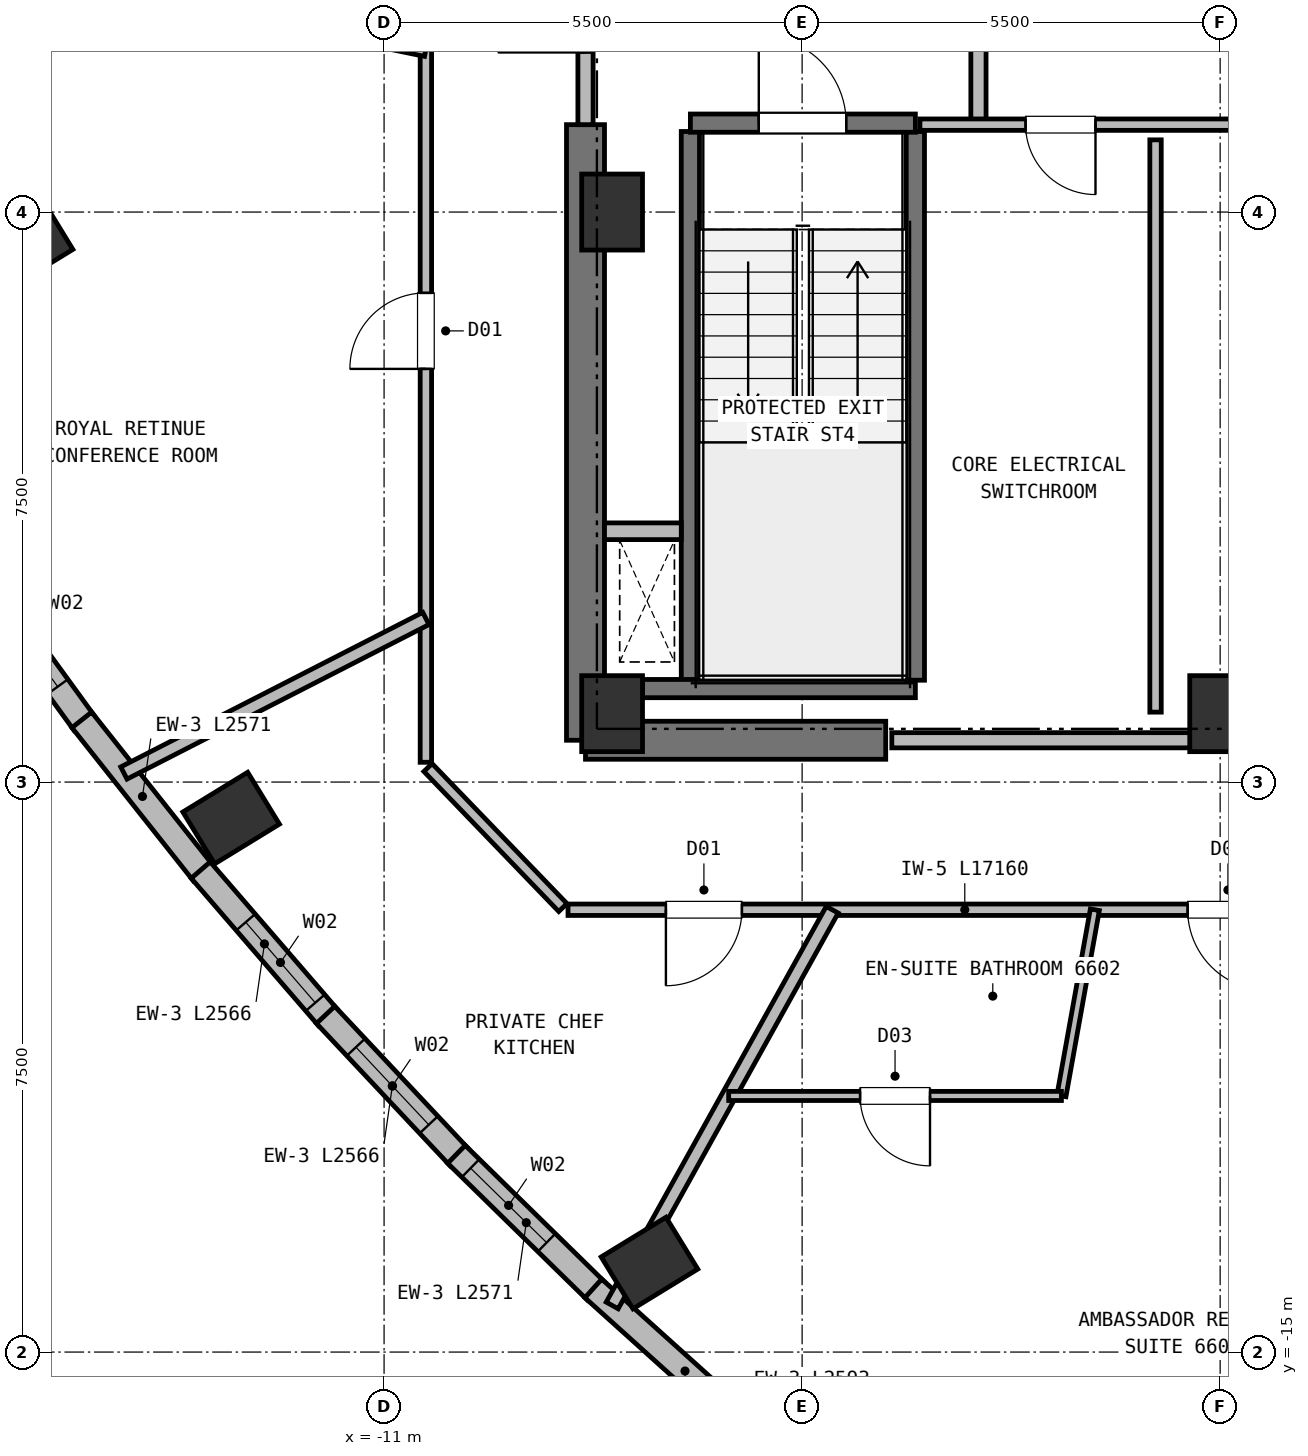
"""IFC4 building model, lengths in metres.
Left out: names, types, materials, properties, quantities, classifications, styles, units other than length and angle.
Written with IfcOpenShell. Run it as: python <this file> out.ifc"""

import sys

from ifc_helpers import new_model, si_unit, direction, frame, frame_2d, origin, origin_2d, place, context, subcontext, project, spatial, rectangle, extrude, element, fill, save


model = new_model("IFC4")
c1 = context("Model", 3, precision=1e-05, world=origin(), true_north=direction((0.0, 1.0)))
c2 = subcontext(c1, "Body", "Model", "MODEL_VIEW")
j1 = project(units=[si_unit("LENGTHUNIT", "METRE"), si_unit("PLANEANGLEUNIT", "RADIAN")], contexts=[c1])
p1 = place(None, origin())
s1 = spatial("IfcSite", under=j1, at=p1, CompositionType="ELEMENT")
p2 = place(p1, origin())
s2 = spatial("IfcBuilding", under=s1, at=p2, CompositionType="ELEMENT")
p3 = place(p2, frame((0.0, 0.0, 251.15)))
s3 = spatial("IfcBuildingStorey", under=s2, at=p3, CompositionType="ELEMENT", Elevation=251.15)
for number, where, z_axis, x_axis in (
    (1, (-8.0, -6.6, 0.0), (0.0, 0.0, 1.0), (1.0, 0.0, 0.0)),
    (2, (0.0, -6.6, 0.0), (0.0, 0.0, 1.0), (1.0, 0.0, 0.0)),
    (3, (-8.0, 0.0, 0.0), (0.0, 0.0, 1.0), (1.0, 0.0, 0.0)),
):
    element("IfcColumn", number, at=place(p3, frame(where, z_axis=z_axis, x_axis=x_axis)), inside=s3, PredefinedType="COLUMN", context=c2, shape_type="SweptSolid", body=[
        extrude(rectangle(XDim=0.8, YDim=1.0, at=origin_2d()), origin(), (0.0, 0.0, 1.0), 3.8),
    ])
p4 = place(p3, frame((-8.35, -6.95, 0.0), z_axis=(0.0, 0.0, 1.0), x_axis=(1.0, 0.0, 0.0)))
e4 = element("IfcWall", 4, at=p4, inside=s3, PredefinedType="SHEAR", context=c2, shape_type="SweptSolid", body=[
    extrude(rectangle(XDim=3.95, YDim=0.5, at=frame_2d((1.975, 0.0))), origin(), (0.0, 0.0, 1.0), 3.49),
])
p5 = place(p3, frame((-8.35, -6.95, 0.0), z_axis=(0.0, 0.0, 1.0), x_axis=(0.0, 1.0, 0.0)))
e5 = element("IfcWall", 5, at=p5, inside=s3, PredefinedType="SHEAR", context=c2, shape_type="SweptSolid", body=[
    extrude(rectangle(XDim=8.1, YDim=0.5, at=frame_2d((4.05, 0.0))), origin(), (0.0, 0.0, 1.0), 3.49),
])
for number, where, z_axis, x_axis in (
    (6, (-15.73, -0.412, 0.0), (0.0, 0.0, 1.0), (-0.522, 0.853, 0.0)),
    (7, (-13.012, -7.974, 0.0), (0.0, 0.0, 1.0), (-0.522, 0.853, 0.0)),
    (8, (-7.508, -13.828, 0.0), (0.0, 0.0, 1.0), (-0.522, 0.853, 0.0)),
):
    element("IfcColumn", number, at=place(p3, frame(where, z_axis=z_axis, x_axis=x_axis)), inside=s3, PredefinedType="COLUMN", context=c2, shape_type="SweptSolid", body=[
        extrude(rectangle(XDim=0.8, YDim=1.0, at=origin_2d()), origin(), (0.0, 0.0, 1.0), 3.8),
    ])
p6 = place(p3, frame((-14.947, -6.722, 0.0), z_axis=(0.0, 0.0, 1.0), x_axis=(-0.588014094106, 0.808850681605, 0.0)))
e9 = element("IfcWall", 9, at=p6, inside=s3, PredefinedType="SOLIDWALL", context=c2, shape_type="SweptSolid", body=[
    extrude(rectangle(XDim=2.579, YDim=0.33, at=frame_2d((1.29, 0.0))), origin(), (0.0, 0.0, 1.0), 3.49),
])
p7 = place(p6, frame((0.59, 0.0, 0.72)))
e10 = element("IfcOpeningElement", 10, at=p7, cuts=e9, PredefinedType="OPENING", context=c2, shape_type="SweptSolid", body=[
    extrude(rectangle(XDim=1.4, YDim=1.84, at=frame_2d((0.7, 0.92))), frame((0.0, 0.175, 0.0), z_axis=(0.0, -1.0, 0.0), x_axis=(1.0, 0.0, 0.0)), (0.0, 0.0, 1.0), 0.35),
])
p8 = place(p3, frame((-13.381, -8.697, 0.0), z_axis=(0.0, 0.0, 1.0), x_axis=(-0.621121262794, 0.783714474094, 0.0)))
e11 = element("IfcWall", 11, at=p8, inside=s3, PredefinedType="SOLIDWALL", context=c2, shape_type="SweptSolid", body=[
    extrude(rectangle(XDim=2.571, YDim=0.33, at=frame_2d((1.285, 0.0))), origin(), (0.0, 0.0, 1.0), 3.49),
])
p9 = place(p3, frame((-11.736, -10.601, 0.0), z_axis=(0.0, 0.0, 1.0), x_axis=(-0.653451409245, 0.756968464175, 0.0)))
e12 = element("IfcWall", 12, at=p9, inside=s3, PredefinedType="SOLIDWALL", context=c2, shape_type="SweptSolid", body=[
    extrude(rectangle(XDim=2.566, YDim=0.33, at=frame_2d((1.283, 0.0))), origin(), (0.0, 0.0, 1.0), 3.49),
])
p10 = place(p9, frame((0.26, 0.0, 0.72)))
e13 = element("IfcOpeningElement", 13, at=p10, cuts=e12, PredefinedType="OPENING", context=c2, shape_type="SweptSolid", body=[
    extrude(rectangle(XDim=1.4, YDim=1.84, at=frame_2d((0.7, 0.92))), frame((0.0, 0.175, 0.0), z_axis=(0.0, -1.0, 0.0), x_axis=(1.0, 0.0, 0.0)), (0.0, 0.0, 1.0), 0.35),
])
p11 = place(p3, frame((-10.013, -12.434, 0.0), z_axis=(0.0, 0.0, 1.0), x_axis=(-0.684542205885, 0.728973228838, 0.0)))
e14 = element("IfcWall", 14, at=p11, inside=s3, PredefinedType="SOLIDWALL", context=c2, shape_type="SweptSolid", body=[
    extrude(rectangle(XDim=2.566, YDim=0.33, at=frame_2d((1.283, 0.0))), origin(), (0.0, 0.0, 1.0), 3.49),
])
p12 = place(p11, frame((0.583, 0.0, 0.72)))
e15 = element("IfcOpeningElement", 15, at=p12, cuts=e14, PredefinedType="OPENING", context=c2, shape_type="SweptSolid", body=[
    extrude(rectangle(XDim=1.4, YDim=1.84, at=frame_2d((0.7, 0.92))), frame((0.0, 0.175, 0.0), z_axis=(0.0, -1.0, 0.0), x_axis=(1.0, 0.0, 0.0)), (0.0, 0.0, 1.0), 0.35),
])
p13 = place(p3, frame((-8.211, -14.197, 0.0), z_axis=(0.0, 0.0, 1.0), x_axis=(-0.714475808012, 0.699660145903, 0.0)))
e16 = element("IfcWall", 16, at=p13, inside=s3, PredefinedType="SOLIDWALL", context=c2, shape_type="SweptSolid", body=[
    extrude(rectangle(XDim=2.571, YDim=0.33, at=frame_2d((1.285, 0.0))), origin(), (0.0, 0.0, 1.0), 3.49),
])
p14 = place(p13, frame((0.911, 0.0, 0.72)))
e17 = element("IfcOpeningElement", 17, at=p14, cuts=e16, PredefinedType="OPENING", context=c2, shape_type="SweptSolid", body=[
    extrude(rectangle(XDim=1.4, YDim=1.84, at=frame_2d((0.7, 0.92))), frame((0.0, 0.175, 0.0), z_axis=(0.0, -1.0, 0.0), x_axis=(1.0, 0.0, 0.0)), (0.0, 0.0, 1.0), 0.35),
])
p15 = place(p3, frame((-6.331, -15.889, 0.0), z_axis=(0.0, 0.0, 1.0), x_axis=(-0.743011695314, 0.669278432811, 0.0)))
e18 = element("IfcWall", 18, at=p15, inside=s3, PredefinedType="SOLIDWALL", context=c2, shape_type="SweptSolid", body=[
    extrude(rectangle(XDim=2.579, YDim=0.33, at=frame_2d((1.29, 0.0))), origin(), (0.0, 0.0, 1.0), 3.49),
])
p16 = place(p3, frame((-6.97, -6.16, 0.0), z_axis=(0.0, 0.0, 1.0), x_axis=(0.0, 1.0, 0.0)))
e19 = element("IfcWall", 19, at=p16, inside=s3, PredefinedType="SHEAR", context=c2, shape_type="SweptSolid", body=[
    extrude(rectangle(XDim=7.22, YDim=0.24, at=frame_2d((3.61, 0.0))), origin(), (0.0, 0.0, 1.0), 3.49),
])
p17 = place(p3, frame((-7.6, -6.27, 0.0), z_axis=(0.0, 0.0, 1.0), x_axis=(1.0, 0.0, 0.0)))
e20 = element("IfcWall", 20, at=p17, inside=s3, PredefinedType="SHEAR", context=c2, shape_type="SweptSolid", body=[
    extrude(rectangle(XDim=3.59, YDim=0.24, at=frame_2d((1.795, 0.0))), origin(), (0.0, 0.0, 1.0), 3.49),
])
p18 = place(p3, frame((-4.01, -6.16, 0.0), z_axis=(0.0, 0.0, 1.0), x_axis=(0.0, 1.0, 0.0)))
e21 = element("IfcWall", 21, at=p18, inside=s3, PredefinedType="SHEAR", context=c2, shape_type="SweptSolid", body=[
    extrude(rectangle(XDim=7.22, YDim=0.24, at=frame_2d((3.61, 0.0))), origin(), (0.0, 0.0, 1.0), 3.49),
])
p19 = place(p3, frame((-6.97, 1.17, 0.0), z_axis=(0.0, 0.0, 1.0), x_axis=(1.0, 0.0, 0.0)))
e22 = element("IfcWall", 22, at=p19, inside=s3, PredefinedType="SHEAR", context=c2, shape_type="SweptSolid", body=[
    extrude(rectangle(XDim=2.96, YDim=0.24, at=frame_2d((1.48, 0.0))), origin(), (0.0, 0.0, 1.0), 3.49),
])
p20 = place(p19, frame((0.9, 0.0, 0.0)))
e23 = element("IfcOpeningElement", 23, at=p20, cuts=e22, PredefinedType="OPENING", context=c2, shape_type="SweptSolid", body=[
    extrude(rectangle(XDim=1.15, YDim=2.15, at=frame_2d((0.575, 1.075))), frame((0.0, 0.13, 0.0), z_axis=(0.0, -1.0, 0.0), x_axis=(1.0, 0.0, 0.0)), (0.0, 0.0, 1.0), 0.26),
])
p21 = place(p3, frame((-8.1, -4.2, 0.0), z_axis=(0.0, 0.0, 1.0), x_axis=(1.0, 0.0, 0.0)))
e24 = element("IfcWall", 24, at=p21, inside=s3, PredefinedType="PARTITIONING", context=c2, shape_type="SweptSolid", body=[
    extrude(rectangle(XDim=1.01, YDim=0.22, at=frame_2d((0.505, 0.0))), origin(), (0.0, 0.0, 1.0), 3.49),
])
p22 = place(p3, frame((-3.18, 1.15, 0.0), z_axis=(0.0, 0.0, 1.0), x_axis=(0.0, 1.0, 0.0)))
e25 = element("IfcWall", 25, at=p22, inside=s3, PredefinedType="PARTITIONING", context=c2, shape_type="SweptSolid", body=[
    extrude(rectangle(XDim=3.3, YDim=0.2, at=frame_2d((1.65, 0.0))), origin(), (0.0, 0.0, 1.0), 3.49),
])
p23 = place(p22, frame((1.08, 0.0, 0.0)))
e26 = element("IfcOpeningElement", 26, at=p23, cuts=e25, PredefinedType="OPENING", context=c2, shape_type="SweptSolid", body=[
    extrude(rectangle(XDim=1.15, YDim=2.15, at=frame_2d((0.575, 1.075))), frame((0.0, 0.11, 0.0), z_axis=(0.0, -1.0, 0.0), x_axis=(1.0, 0.0, 0.0)), (0.0, 0.0, 1.0), 0.22),
])
p24 = place(p3, frame((-8.35, 1.15, 0.0), z_axis=(0.0, 0.0, 1.0), x_axis=(0.0, 1.0, 0.0)))
e27 = element("IfcWall", 27, at=p24, inside=s3, PredefinedType="PARTITIONING", context=c2, shape_type="SweptSolid", body=[
    extrude(rectangle(XDim=5.4, YDim=0.2, at=frame_2d((2.7, 0.0))), origin(), (0.0, 0.0, 1.0), 3.49),
])
p25 = place(p24, frame((0.95, 0.0, 0.0)))
e28 = element("IfcOpeningElement", 28, at=p25, cuts=e27, PredefinedType="OPENING", context=c2, shape_type="SweptSolid", body=[
    extrude(rectangle(XDim=1.15, YDim=2.15, at=frame_2d((0.575, 1.075))), frame((0.0, 0.11, 0.0), z_axis=(0.0, -1.0, 0.0), x_axis=(1.0, 0.0, 0.0)), (0.0, 0.0, 1.0), 0.22),
])
p26 = place(p3, frame((3.95, 1.15, 0.0), z_axis=(0.0, 0.0, 1.0), x_axis=(-1.0, 0.0, 0.0)))
e29 = element("IfcWall", 29, at=p26, inside=s3, PredefinedType="PARTITIONING", context=c2, shape_type="SweptSolid", body=[
    extrude(rectangle(XDim=7.9, YDim=0.15, at=frame_2d((3.95, 0.0))), origin(), (0.0, 0.0, 1.0), 3.49),
])
p27 = place(p26, frame((5.59, 0.0, 0.0)))
e30 = element("IfcOpeningElement", 30, at=p27, cuts=e29, PredefinedType="OPENING", context=c2, shape_type="SweptSolid", body=[
    extrude(rectangle(XDim=0.92, YDim=2.05, at=frame_2d((0.46, 1.025))), frame((0.0, 0.085, 0.0), z_axis=(0.0, -1.0, 0.0), x_axis=(1.0, 0.0, 0.0)), (0.0, 0.0, 1.0), 0.17),
])
p28 = place(p26, frame((2.14, 0.0, 0.0)))
e31 = element("IfcOpeningElement", 31, at=p28, cuts=e29, PredefinedType="OPENING", context=c2, shape_type="SweptSolid", body=[
    extrude(rectangle(XDim=0.92, YDim=2.05, at=frame_2d((0.46, 1.025))), frame((0.0, 0.085, 0.0), z_axis=(0.0, -1.0, 0.0), x_axis=(1.0, 0.0, 0.0)), (0.0, 0.0, 1.0), 0.17),
])
p29 = place(p3, frame((-4.32, -6.95, 0.0), z_axis=(0.0, 0.0, 1.0), x_axis=(1.0, 0.0, 0.0)))
e32 = element("IfcWall", 32, at=p29, inside=s3, PredefinedType="PARTITIONING", context=c2, shape_type="SweptSolid", body=[
    extrude(rectangle(XDim=8.64, YDim=0.2, at=frame_2d((4.32, 0.0))), origin(), (0.0, 0.0, 1.0), 3.49),
])
p30 = place(p3, frame((-0.85, -6.58, 0.0), z_axis=(0.0, 0.0, 1.0), x_axis=(0.0, 1.0, 0.0)))
e33 = element("IfcWall", 33, at=p30, inside=s3, PredefinedType="PARTITIONING", context=c2, shape_type="SweptSolid", body=[
    extrude(rectangle(XDim=7.53, YDim=0.15, at=frame_2d((3.765, 0.0))), origin(), (0.0, 0.0, 1.0), 3.49),
])
p31 = place(p3, frame((8.58, -9.18, 0.0), z_axis=(0.0, 0.0, 1.0), x_axis=(-1.0, 0.0, 0.0)))
e34 = element("IfcWall", 34, at=p31, inside=s3, PredefinedType="PARTITIONING", context=c2, shape_type="SweptSolid", body=[
    extrude(rectangle(XDim=17.16, YDim=0.15, at=frame_2d((8.58, 0.0))), origin(), (0.0, 0.0, 1.0), 3.17),
])
p32 = place(p31, frame((14.872, 0.0, 0.0)))
e35 = element("IfcOpeningElement", 35, at=p32, cuts=e34, PredefinedType="OPENING", context=c2, shape_type="SweptSolid", body=[
    extrude(rectangle(XDim=1.0, YDim=2.15, at=frame_2d((0.5, 1.075))), frame((0.0, 0.085, 0.0), z_axis=(0.0, -1.0, 0.0), x_axis=(1.0, 0.0, 0.0)), (0.0, 0.0, 1.0), 0.17),
])
p33 = place(p31, frame((2.954, 0.0, 0.0)))
e36 = element("IfcOpeningElement", 36, at=p33, cuts=e34, PredefinedType="OPENING", context=c2, shape_type="SweptSolid", body=[
    extrude(rectangle(XDim=1.0, YDim=2.15, at=frame_2d((0.5, 1.075))), frame((0.0, 0.085, 0.0), z_axis=(0.0, -1.0, 0.0), x_axis=(1.0, 0.0, 0.0)), (0.0, 0.0, 1.0), 0.17),
])
p34 = place(p31, frame((7.948, 0.0, 0.0)))
e37 = element("IfcOpeningElement", 37, at=p34, cuts=e34, PredefinedType="OPENING", context=c2, shape_type="SweptSolid", body=[
    extrude(rectangle(XDim=1.06, YDim=2.15, at=frame_2d((0.53, 1.075))), frame((0.0, 0.085, 0.0), z_axis=(0.0, -1.0, 0.0), x_axis=(1.0, 0.0, 0.0)), (0.0, 0.0, 1.0), 0.17),
])
p35 = place(p3, frame((-10.45, -7.24, 0.0), z_axis=(0.0, 0.0, 1.0), x_axis=(0.0, 1.0, 0.0)))
e38 = element("IfcWall", 38, at=p35, inside=s3, PredefinedType="PARTITIONING", context=c2, shape_type="SweptSolid", body=[
    extrude(rectangle(XDim=14.48, YDim=0.15, at=frame_2d((7.24, 0.0))), origin(), (0.0, 0.0, 1.0), 3.17),
])
p36 = place(p35, frame((5.177, 0.0, 0.0)))
e39 = element("IfcOpeningElement", 39, at=p36, cuts=e38, PredefinedType="OPENING", context=c2, shape_type="SweptSolid", body=[
    extrude(rectangle(XDim=1.0, YDim=2.15, at=frame_2d((0.5, 1.075))), frame((0.0, 0.085, 0.0), z_axis=(0.0, -1.0, 0.0), x_axis=(1.0, 0.0, 0.0)), (0.0, 0.0, 1.0), 0.17),
])
p37 = place(p35, frame((11.378, 0.0, 0.0)))
e40 = element("IfcOpeningElement", 40, at=p37, cuts=e38, PredefinedType="OPENING", context=c2, shape_type="SweptSolid", body=[
    extrude(rectangle(XDim=1.0, YDim=2.15, at=frame_2d((0.5, 1.075))), frame((0.0, 0.085, 0.0), z_axis=(0.0, -1.0, 0.0), x_axis=(1.0, 0.0, 0.0)), (0.0, 0.0, 1.0), 0.17),
])
p38 = place(p3, frame((-8.648, -9.151, 0.0), z_axis=(0.0, 0.0, 1.0), x_axis=(-0.693764562202, 0.720201869085, 0.0)))
e41 = element("IfcWall", 41, at=p38, inside=s3, PredefinedType="PARTITIONING", context=c2, shape_type="SweptSolid", body=[
    extrude(rectangle(XDim=2.558, YDim=0.15, at=frame_2d((1.279, 0.0))), origin(), (0.0, 0.0, 1.0), 3.17),
])
p39 = place(p3, frame((-10.45, 2.137, 0.0), z_axis=(0.0, 0.0, 1.0), x_axis=(-0.979726343825, 0.200340438291, 0.0)))
e42 = element("IfcWall", 42, at=p39, inside=s3, PredefinedType="PARTITIONING", context=c2, shape_type="SweptSolid", body=[
    extrude(rectangle(XDim=11.454, YDim=0.18, at=frame_2d((5.727, 0.0))), origin(), (0.0, 0.0, 1.0), 3.49),
])
p40 = place(p3, frame((-10.45, -5.348, 0.0), z_axis=(0.0, 0.0, 1.0), x_axis=(-0.890198125896, -0.455573590819, 0.0)))
e43 = element("IfcWall", 43, at=p40, inside=s3, PredefinedType="PARTITIONING", context=c2, shape_type="SweptSolid", body=[
    extrude(rectangle(XDim=4.463, YDim=0.18, at=frame_2d((2.232, 0.0))), origin(), (0.0, 0.0, 1.0), 3.49),
])
p41 = place(p3, frame((-5.104, -9.18, 0.0), z_axis=(0.0, 0.0, 1.0), x_axis=(-0.485931716626, -0.873996777327, 0.0)))
e44 = element("IfcWall", 44, at=p41, inside=s3, PredefinedType="PARTITIONING", context=c2, shape_type="SweptSolid", body=[
    extrude(rectangle(XDim=5.957, YDim=0.18, at=frame_2d((2.979, 0.0))), origin(), (0.0, 0.0, 1.0), 3.49),
])
p42 = place(p3, frame((-1.648, -9.18, 0.0), z_axis=(0.0, 0.0, 1.0), x_axis=(-0.176744464774, -0.984256772479, 0.0)))
e45 = element("IfcWall", 45, at=p42, inside=s3, PredefinedType="PARTITIONING", context=c2, shape_type="SweptSolid", body=[
    extrude(rectangle(XDim=2.489, YDim=0.12, at=frame_2d((1.245, 0.0))), origin(), (0.0, 0.0, 1.0), 3.49),
])
p43 = place(p3, frame((-2.088, -11.63, 0.0), z_axis=(0.0, 0.0, 1.0), x_axis=(-1.0, 0.0, 0.0)))
e46 = element("IfcWall", 46, at=p43, inside=s3, PredefinedType="PARTITIONING", context=c2, shape_type="SweptSolid", body=[
    extrude(rectangle(XDim=4.378, YDim=0.12, at=frame_2d((2.189, 0.0))), origin(), (0.0, 0.0, 1.0), 3.49),
])
p44 = place(p43, frame((1.729, 0.0, 0.0)))
e47 = element("IfcOpeningElement", 47, at=p44, cuts=e46, PredefinedType="OPENING", context=c2, shape_type="SweptSolid", body=[
    extrude(rectangle(XDim=0.92, YDim=2.1, at=frame_2d((0.46, 1.05))), frame((0.0, 0.07, 0.0), z_axis=(0.0, -1.0, 0.0), x_axis=(1.0, 0.0, 0.0)), (0.0, 0.0, 1.0), 0.14),
])
p45 = place(p7, origin())
e48 = element("IfcWindow", 48, at=p45, inside=s3, PartitioningType="SINGLE_PANEL", PredefinedType="WINDOW", context=c2, shape_type="SweptSolid", body=[
    extrude(rectangle(XDim=1.4, YDim=1.84, at=frame_2d((0.7, 0.92))), frame((0.0, 0.03, 0.0), z_axis=(0.0, -1.0, 0.0), x_axis=(1.0, 0.0, 0.0)), (0.0, 0.0, 1.0), 0.06),
])
fill(e10, e48)
p46 = place(p10, origin())
e49 = element("IfcWindow", 49, at=p46, inside=s3, PartitioningType="SINGLE_PANEL", PredefinedType="WINDOW", context=c2, shape_type="SweptSolid", body=[
    extrude(rectangle(XDim=1.4, YDim=1.84, at=frame_2d((0.7, 0.92))), frame((0.0, 0.03, 0.0), z_axis=(0.0, -1.0, 0.0), x_axis=(1.0, 0.0, 0.0)), (0.0, 0.0, 1.0), 0.06),
])
fill(e13, e49)
p47 = place(p12, origin())
e50 = element("IfcWindow", 50, at=p47, inside=s3, PartitioningType="SINGLE_PANEL", PredefinedType="WINDOW", context=c2, shape_type="SweptSolid", body=[
    extrude(rectangle(XDim=1.4, YDim=1.84, at=frame_2d((0.7, 0.92))), frame((0.0, 0.03, 0.0), z_axis=(0.0, -1.0, 0.0), x_axis=(1.0, 0.0, 0.0)), (0.0, 0.0, 1.0), 0.06),
])
fill(e15, e50)
p48 = place(p14, origin())
e51 = element("IfcWindow", 51, at=p48, inside=s3, PartitioningType="SINGLE_PANEL", PredefinedType="WINDOW", context=c2, shape_type="SweptSolid", body=[
    extrude(rectangle(XDim=1.4, YDim=1.84, at=frame_2d((0.7, 0.92))), frame((0.0, 0.03, 0.0), z_axis=(0.0, -1.0, 0.0), x_axis=(1.0, 0.0, 0.0)), (0.0, 0.0, 1.0), 0.06),
])
fill(e17, e51)
p49 = place(p20, origin())
e52 = element("IfcDoor", 52, at=p49, inside=s3, OperationType="SINGLE_SWING_LEFT", PredefinedType="DOOR", context=c2, shape_type="SweptSolid", body=[
    extrude(rectangle(XDim=1.15, YDim=2.15, at=frame_2d((0.575, 1.075))), frame((0.0, 0.025, 0.0), z_axis=(0.0, -1.0, 0.0), x_axis=(1.0, 0.0, 0.0)), (0.0, 0.0, 1.0), 0.05),
])
fill(e23, e52)
p50 = place(p25, origin())
e53 = element("IfcDoor", 53, at=p50, inside=s3, OperationType="SINGLE_SWING_LEFT", PredefinedType="DOOR", context=c2, shape_type="SweptSolid", body=[
    extrude(rectangle(XDim=1.15, YDim=2.15, at=frame_2d((0.575, 1.075))), frame((0.0, 0.025, 0.0), z_axis=(0.0, -1.0, 0.0), x_axis=(1.0, 0.0, 0.0)), (0.0, 0.0, 1.0), 0.05),
])
fill(e28, e53)
p51 = place(p27, origin())
e54 = element("IfcDoor", 54, at=p51, inside=s3, OperationType="SINGLE_SWING_LEFT", PredefinedType="DOOR", context=c2, shape_type="SweptSolid", body=[
    extrude(rectangle(XDim=0.92, YDim=2.05, at=frame_2d((0.46, 1.025))), frame((0.0, 0.025, 0.0), z_axis=(0.0, -1.0, 0.0), x_axis=(1.0, 0.0, 0.0)), (0.0, 0.0, 1.0), 0.05),
])
fill(e30, e54)
p52 = place(p44, origin())
e55 = element("IfcDoor", 55, at=p52, inside=s3, OperationType="SINGLE_SWING_LEFT", PredefinedType="DOOR", context=c2, shape_type="SweptSolid", body=[
    extrude(rectangle(XDim=0.92, YDim=2.1, at=frame_2d((0.46, 1.05))), frame((0.0, 0.025, 0.0), z_axis=(0.0, -1.0, 0.0), x_axis=(1.0, 0.0, 0.0)), (0.0, 0.0, 1.0), 0.05),
])
fill(e47, e55)
p53 = place(p32, origin())
e56 = element("IfcDoor", 56, at=p53, inside=s3, OperationType="SINGLE_SWING_RIGHT", PredefinedType="DOOR", context=c2, shape_type="SweptSolid", body=[
    extrude(rectangle(XDim=1.0, YDim=2.15, at=frame_2d((0.5, 1.075))), frame((0.0, 0.025, 0.0), z_axis=(0.0, -1.0, 0.0), x_axis=(1.0, 0.0, 0.0)), (0.0, 0.0, 1.0), 0.05),
])
fill(e35, e56)
p54 = place(p36, origin())
e57 = element("IfcDoor", 57, at=p54, inside=s3, OperationType="SINGLE_SWING_LEFT", PredefinedType="DOOR", context=c2, shape_type="SweptSolid", body=[
    extrude(rectangle(XDim=1.0, YDim=2.15, at=frame_2d((0.5, 1.075))), frame((0.0, 0.025, 0.0), z_axis=(0.0, -1.0, 0.0), x_axis=(1.0, 0.0, 0.0)), (0.0, 0.0, 1.0), 0.05),
])
fill(e39, e57)
p55 = place(p34, origin())
e58 = element("IfcDoor", 58, at=p55, inside=s3, OperationType="SINGLE_SWING_LEFT", PredefinedType="DOOR", context=c2, shape_type="SweptSolid", body=[
    extrude(rectangle(XDim=1.06, YDim=2.15, at=frame_2d((0.53, 1.075))), frame((0.0, 0.025, 0.0), z_axis=(0.0, -1.0, 0.0), x_axis=(1.0, 0.0, 0.0)), (0.0, 0.0, 1.0), 0.05),
])
fill(e37, e58)
save(model, sys.argv[1])
